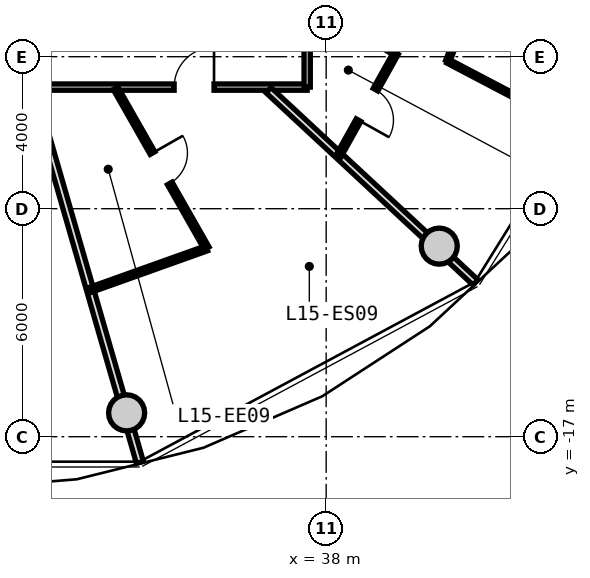
"""IFC4 building model, lengths in metres.
Left out: names, types, materials, properties, quantities, classifications, styles, units other than length and angle.
Written with IfcOpenShell. Run it as: python <this file> out.ifc"""

import sys

from ifc_helpers import new_model, si_unit, direction, frame, frame_2d, origin, origin_2d, place, context, subcontext, project, spatial, rectangle, circle, extrude, source, transform, mapped, element, fill, save


model = new_model("IFC4")
c1 = context("Model", 3, precision=1e-05, world=origin(), true_north=direction((0.0, 1.0)))
c2 = subcontext(c1, "Body", "Model", "MODEL_VIEW")
j1 = project(units=[si_unit("LENGTHUNIT", "METRE"), si_unit("PLANEANGLEUNIT", "RADIAN")], contexts=[c1])
p1 = place(None, origin())
s1 = spatial("IfcSite", under=j1, at=p1, CompositionType="ELEMENT")
p2 = place(p1, origin())
s2 = spatial("IfcBuilding", under=s1, at=p2, CompositionType="ELEMENT")
p3 = place(p2, frame((0.0, 0.0, 52.1)))
s3 = spatial("IfcBuildingStorey", under=s2, at=p3, CompositionType="ELEMENT", Elevation=52.1)
m1 = source(origin(), c2, "Body", "SweptSolid", [
    extrude(circle(Radius=0.475, at=origin_2d()), origin(), (0.0, 0.0, 1.0), 3.05),
])
for number, where, z_axis, x_axis in (
    (1, (32.749, -16.373, 0.0), (0.0, 0.0, 1.0), (1.0, 0.0, 0.0)),
    (2, (40.975, -11.985, 0.0), (0.0, 0.0, 1.0), (1.0, 0.0, 0.0)),
):
    element("IfcColumn", number, at=place(p3, frame(where, z_axis=z_axis, x_axis=x_axis)), inside=s3, PredefinedType="COLUMN", context=c2, shape_type="MappedRepresentation", body=[
        mapped(m1, transform((0.0, 0.0, 0.0), x_axis=(1.0, 0.0, 0.0), y_axis=(0.0, 1.0, 0.0), z_axis=(0.0, 0.0, 1.0), scale=1.0)),
    ])
m2 = source(origin(), c2, "Body", "SweptSolid", [
    extrude(rectangle(XDim=19.0, YDim=0.165, at=frame_2d((9.5, 0.0))), origin(), (0.0, 0.0, 1.0), 2.775),
])
p4 = place(p3, frame((37.5, -7.8, 0.0), z_axis=(0.0, 0.0, 1.0), x_axis=(-1.0, 0.0, 0.0)))
e3 = element("IfcWall", 3, at=p4, inside=s3, PredefinedType="PARTITIONING", context=c2, shape_type="MappedRepresentation", body=[
    mapped(m2, transform((0.0, 0.0, 0.0), x_axis=(1.0, 0.0, 0.0), y_axis=(0.0, 1.0, 0.0), z_axis=(0.0, 0.0, 1.0), scale=1.0)),
])
p5 = place(p4, frame((12.706, 0.0, 0.0)))
e4 = element("IfcOpeningElement", 4, at=p5, cuts=e3, PredefinedType="OPENING", context=c2, shape_type="SweptSolid", body=[
    extrude(rectangle(XDim=1.05, YDim=2.15, at=frame_2d((0.525, 1.075))), frame((0.0, 0.093, 0.0), z_axis=(0.0, -1.0, 0.0), x_axis=(1.0, 0.0, 0.0)), (0.0, 0.0, 1.0), 0.185),
])
p6 = place(p4, frame((7.959, 0.0, 0.0)))
e5 = element("IfcOpeningElement", 5, at=p6, cuts=e3, PredefinedType="OPENING", context=c2, shape_type="SweptSolid", body=[
    extrude(rectangle(XDim=1.05, YDim=2.15, at=frame_2d((0.525, 1.075))), frame((0.0, 0.093, 0.0), z_axis=(0.0, -1.0, 0.0), x_axis=(1.0, 0.0, 0.0)), (0.0, 0.0, 1.0), 0.185),
])
p7 = place(p4, frame((2.451, 0.0, 0.0)))
e6 = element("IfcOpeningElement", 6, at=p7, cuts=e3, PredefinedType="OPENING", context=c2, shape_type="SweptSolid", body=[
    extrude(rectangle(XDim=1.05, YDim=2.15, at=frame_2d((0.525, 1.075))), frame((0.0, 0.093, 0.0), z_axis=(0.0, -1.0, 0.0), x_axis=(1.0, 0.0, 0.0)), (0.0, 0.0, 1.0), 0.185),
])
m3 = source(origin(), c2, "Body", "SweptSolid", [
    extrude(rectangle(XDim=15.6, YDim=0.165, at=frame_2d((7.8, 0.0))), origin(), (0.0, 0.0, 1.0), 2.775),
])
p8 = place(p3, frame((37.5, 7.8, 0.0), z_axis=(0.0, 0.0, 1.0), x_axis=(0.0, -1.0, 0.0)))
e7 = element("IfcWall", 7, at=p8, inside=s3, PredefinedType="PARTITIONING", context=c2, shape_type="MappedRepresentation", body=[
    mapped(m3, transform((0.0, 0.0, 0.0), x_axis=(1.0, 0.0, 0.0), y_axis=(0.0, 1.0, 0.0), z_axis=(0.0, 0.0, 1.0), scale=1.0)),
])
p9 = place(p8, frame((8.835, 0.0, 0.0)))
e8 = element("IfcOpeningElement", 8, at=p9, cuts=e7, PredefinedType="OPENING", context=c2, shape_type="SweptSolid", body=[
    extrude(rectangle(XDim=1.05, YDim=2.15, at=frame_2d((0.525, 1.075))), frame((0.0, 0.093, 0.0), z_axis=(0.0, -1.0, 0.0), x_axis=(1.0, 0.0, 0.0)), (0.0, 0.0, 1.0), 0.185),
])
p10 = place(p8, frame((2.208, 0.0, 0.0)))
e9 = element("IfcOpeningElement", 9, at=p10, cuts=e7, PredefinedType="OPENING", context=c2, shape_type="SweptSolid", body=[
    extrude(rectangle(XDim=1.25, YDim=2.2, at=frame_2d((0.625, 1.1))), frame((0.0, 0.093, 0.0), z_axis=(0.0, -1.0, 0.0), x_axis=(1.0, 0.0, 0.0)), (0.0, 0.0, 1.0), 0.185),
])
m4 = source(origin(), c2, "Body", "SweptSolid", [
    extrude(rectangle(XDim=10.196, YDim=0.19, at=frame_2d((5.098, 0.0))), origin(), (0.0, 0.0, 1.0), 2.225),
])
p11 = place(p3, frame((30.273, -7.88, 0.0), z_axis=(0.0, 0.0, 1.0), x_axis=(0.277136420347, -0.960830580549, 0.0)))
e10 = element("IfcWall", 10, at=p11, inside=s3, PredefinedType="PARTITIONING", context=c2, shape_type="MappedRepresentation", body=[
    mapped(m4, transform((0.0, 0.0, 0.0), x_axis=(1.0, 0.0, 0.0), y_axis=(0.0, 1.0, 0.0), z_axis=(0.0, 0.0, 1.0), scale=1.0)),
])
m5 = source(origin(), c2, "Body", "SweptSolid", [
    extrude(rectangle(XDim=7.435, YDim=0.19, at=frame_2d((3.717, 0.0))), origin(), (0.0, 0.0, 1.0), 2.225),
])
p12 = place(p3, frame((36.483, -7.88, 0.0), z_axis=(0.0, 0.0, 1.0), x_axis=(0.732651956848, -0.680603489652, 0.0)))
e11 = element("IfcWall", 11, at=p12, inside=s3, PredefinedType="PARTITIONING", context=c2, shape_type="MappedRepresentation", body=[
    mapped(m5, transform((0.0, 0.0, 0.0), x_axis=(1.0, 0.0, 0.0), y_axis=(0.0, 1.0, 0.0), z_axis=(0.0, 0.0, 1.0), scale=1.0)),
])
m6 = source(origin(), c2, "Body", "SweptSolid", [
    extrude(rectangle(XDim=4.846, YDim=0.14, at=frame_2d((2.423, 0.0))), origin(), (0.0, 0.0, 1.0), 2.775),
])
p13 = place(p3, frame((32.458, -7.83, 0.0), z_axis=(0.0, 0.0, 1.0), x_axis=(0.494841788743, -0.868983086207, 0.0)))
e12 = element("IfcWall", 12, at=p13, inside=s3, PredefinedType="PARTITIONING", context=c2, shape_type="MappedRepresentation", body=[
    mapped(m6, transform((0.0, 0.0, 0.0), x_axis=(1.0, 0.0, 0.0), y_axis=(0.0, 1.0, 0.0), z_axis=(0.0, 0.0, 1.0), scale=1.0)),
])
p14 = place(p13, frame((1.963, 0.0, 0.0)))
e13 = element("IfcOpeningElement", 13, at=p14, cuts=e12, PredefinedType="OPENING", context=c2, shape_type="SweptSolid", body=[
    extrude(rectangle(XDim=0.92, YDim=2.1, at=frame_2d((0.46, 1.05))), frame((0.0, 0.08, 0.0), z_axis=(0.0, -1.0, 0.0), x_axis=(1.0, 0.0, 0.0)), (0.0, 0.0, 1.0), 0.16),
])
m7 = source(origin(), c2, "Body", "SweptSolid", [
    extrude(rectangle(XDim=3.276, YDim=0.14, at=frame_2d((1.638, 0.0))), origin(), (0.0, 0.0, 1.0), 2.415),
])
p15 = place(p3, frame((34.857, -12.042, 0.0), z_axis=(0.0, 0.0, 1.0), x_axis=(-0.94174696961, -0.336322234221, 0.0)))
e14 = element("IfcWall", 14, at=p15, inside=s3, PredefinedType="PARTITIONING", context=c2, shape_type="MappedRepresentation", body=[
    mapped(m7, transform((0.0, 0.0, 0.0), x_axis=(1.0, 0.0, 0.0), y_axis=(0.0, 1.0, 0.0), z_axis=(0.0, 0.0, 1.0), scale=1.0)),
])
m8 = source(origin(), c2, "Body", "SweptSolid", [
    extrude(rectangle(XDim=2.669, YDim=0.14, at=frame_2d((1.335, 0.0))), origin(), (0.0, 0.0, 1.0), 2.775),
])
p16 = place(p3, frame((37.53, -5.561, 0.0), z_axis=(0.0, 0.0, 1.0), x_axis=(0.86369928178, -0.50400749067, 0.0)))
e15 = element("IfcWall", 15, at=p16, inside=s3, PredefinedType="PARTITIONING", context=c2, shape_type="MappedRepresentation", body=[
    mapped(m8, transform((0.0, 0.0, 0.0), x_axis=(1.0, 0.0, 0.0), y_axis=(0.0, 1.0, 0.0), z_axis=(0.0, 0.0, 1.0), scale=1.0)),
])
m9 = source(origin(), c2, "Body", "SweptSolid", [
    extrude(rectangle(XDim=3.121, YDim=0.14, at=frame_2d((1.561, 0.0))), origin(), (0.0, 0.0, 1.0), 2.775),
])
p17 = place(p3, frame((39.836, -6.906, 0.0), z_axis=(0.0, 0.0, 1.0), x_axis=(-0.487302357327, -0.873233309342, 0.0)))
e16 = element("IfcWall", 16, at=p17, inside=s3, PredefinedType="PARTITIONING", context=c2, shape_type="MappedRepresentation", body=[
    mapped(m9, transform((0.0, 0.0, 0.0), x_axis=(1.0, 0.0, 0.0), y_axis=(0.0, 1.0, 0.0), z_axis=(0.0, 0.0, 1.0), scale=1.0)),
])
p18 = place(p17, frame((1.101, 0.0, 0.0)))
e17 = element("IfcOpeningElement", 17, at=p18, cuts=e16, PredefinedType="OPENING", context=c2, shape_type="SweptSolid", body=[
    extrude(rectangle(XDim=0.92, YDim=2.1, at=frame_2d((0.46, 1.05))), frame((0.0, 0.08, 0.0), z_axis=(0.0, -1.0, 0.0), x_axis=(1.0, 0.0, 0.0)), (0.0, 0.0, 1.0), 0.16),
])
m10 = source(origin(), c2, "Body", "SweptSolid", [
    extrude(rectangle(XDim=3.706, YDim=0.115, at=frame_2d((1.853, 0.0))), origin(), (0.0, 0.0, 1.0), 2.775),
])
p19 = place(p3, frame((41.198, -7.115, 0.0), z_axis=(0.0, 0.0, 1.0), x_axis=(0.88538502503, -0.464858427322, 0.0)))
e18 = element("IfcWall", 18, at=p19, inside=s3, PredefinedType="PARTITIONING", context=c2, shape_type="MappedRepresentation", body=[
    mapped(m10, transform((0.0, 0.0, 0.0), x_axis=(1.0, 0.0, 0.0), y_axis=(0.0, 1.0, 0.0), z_axis=(0.0, 0.0, 1.0), scale=1.0)),
])
m11 = source(origin(), c2, "Body", "SweptSolid", [
    extrude(rectangle(XDim=3.729, YDim=0.115, at=frame_2d((1.864, 0.0))), origin(), (0.0, 0.0, 1.0), 2.775),
])
p20 = place(p3, frame((41.198, -7.115, 0.0), z_axis=(0.0, 0.0, 1.0), x_axis=(0.363055991464, 0.93176732453, 0.0)))
e19 = element("IfcWall", 19, at=p20, inside=s3, PredefinedType="PARTITIONING", context=c2, shape_type="MappedRepresentation", body=[
    mapped(m11, transform((0.0, 0.0, 0.0), x_axis=(1.0, 0.0, 0.0), y_axis=(0.0, 1.0, 0.0), z_axis=(0.0, 0.0, 1.0), scale=1.0)),
])
p21 = place(p20, frame((1.389, 0.0, 0.0)))
e20 = element("IfcOpeningElement", 20, at=p21, cuts=e19, PredefinedType="OPENING", context=c2, shape_type="SweptSolid", body=[
    extrude(rectangle(XDim=0.95, YDim=2.1, at=frame_2d((0.475, 1.05))), frame((0.0, 0.067, 0.0), z_axis=(0.0, -1.0, 0.0), x_axis=(1.0, 0.0, 0.0)), (0.0, 0.0, 1.0), 0.135),
])
m12 = source(origin(), c2, "Body", "SweptSolid", [
    extrude(rectangle(XDim=1.05, YDim=2.15, at=frame_2d((0.525, 1.075))), frame((0.0, 0.025, 0.0), z_axis=(0.0, -1.0, 0.0), x_axis=(1.0, 0.0, 0.0)), (0.0, 0.0, 1.0), 0.05),
])
p22 = place(p7, frame((1.05, 0.0, 0.0), z_axis=(0.0, 0.0, 1.0), x_axis=(-1.0, 0.0, 0.0)))
e21 = element("IfcDoor", 21, at=p22, inside=s3, OperationType="SINGLE_SWING_RIGHT", PredefinedType="DOOR", context=c2, shape_type="MappedRepresentation", body=[
    mapped(m12, transform((0.0, 0.0, 0.0), x_axis=(1.0, 0.0, 0.0), y_axis=(0.0, 1.0, 0.0), z_axis=(0.0, 0.0, 1.0), scale=1.0)),
])
fill(e6, e21)
m13 = source(origin(), c2, "Body", "SweptSolid", [
    extrude(rectangle(XDim=0.92, YDim=2.1, at=frame_2d((0.46, 1.05))), frame((0.0, 0.025, 0.0), z_axis=(0.0, -1.0, 0.0), x_axis=(1.0, 0.0, 0.0)), (0.0, 0.0, 1.0), 0.05),
])
p23 = place(p14, origin())
e22 = element("IfcDoor", 22, at=p23, inside=s3, OperationType="SINGLE_SWING_LEFT", PredefinedType="DOOR", context=c2, shape_type="MappedRepresentation", body=[
    mapped(m13, transform((0.0, 0.0, 0.0), x_axis=(1.0, 0.0, 0.0), y_axis=(0.0, 1.0, 0.0), z_axis=(0.0, 0.0, 1.0), scale=1.0)),
])
fill(e13, e22)
p24 = place(p18, origin())
e23 = element("IfcDoor", 23, at=p24, inside=s3, OperationType="SINGLE_SWING_RIGHT", PredefinedType="DOOR", context=c2, shape_type="MappedRepresentation", body=[
    mapped(m13, transform((0.0, 0.0, 0.0), x_axis=(1.0, 0.0, 0.0), y_axis=(0.0, 1.0, 0.0), z_axis=(0.0, 0.0, 1.0), scale=1.0)),
])
fill(e17, e23)
save(model, sys.argv[1])
